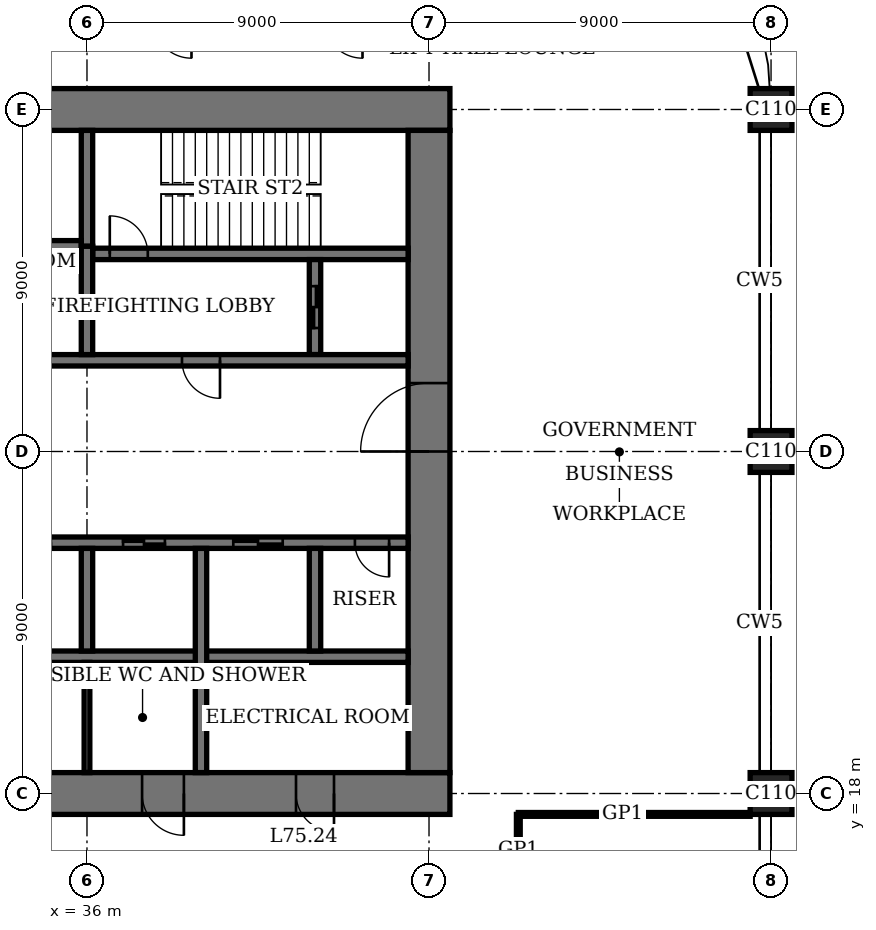
"""IFC4 building model, lengths in metres.
Left out: names, types, materials, properties, quantities, classifications, styles, units other than length and angle.
Written with IfcOpenShell. Run it as: python <this file> out.ifc"""

import sys

from ifc_helpers import new_model, si_unit, direction, frame, frame_2d, origin, origin_2d, place, context, subcontext, project, spatial, rectangle, extrude, element, fill, save


model = new_model("IFC4")
c1 = context("Model", 3, precision=1e-05, world=origin(), true_north=direction((0.0, 1.0)))
c2 = subcontext(c1, "Body", "Model", "MODEL_VIEW")
j1 = project(units=[si_unit("LENGTHUNIT", "METRE"), si_unit("PLANEANGLEUNIT", "RADIAN")], contexts=[c1])
p1 = place(None, origin())
s1 = spatial("IfcSite", under=j1, at=p1, CompositionType="ELEMENT")
p2 = place(p1, origin())
s2 = spatial("IfcBuilding", under=s1, at=p2, CompositionType="ELEMENT")
p3 = place(p2, frame((0.0, 0.0, 307.4)))
s3 = spatial("IfcBuildingStorey", under=s2, at=p3, CompositionType="ELEMENT", Elevation=307.4)
for number, where, z_axis, x_axis in (
    (1, (54.0, 18.0, 0.0), (0.0, 0.0, 1.0), (1.0, 0.0, 0.0)),
    (2, (54.0, 27.0, 0.0), (0.0, 0.0, 1.0), (1.0, 0.0, 0.0)),
    (3, (54.0, 36.0, 0.0), (0.0, 0.0, 1.0), (1.0, 0.0, 0.0)),
):
    element("IfcColumn", number, at=place(p3, frame(where, z_axis=z_axis, x_axis=x_axis)), inside=s3, PredefinedType="COLUMN", context=c2, shape_type="SweptSolid", body=[
        extrude(rectangle(XDim=1.1, YDim=1.1, at=origin_2d()), origin(), (0.0, 0.0, 1.0), 4.4),
    ])
p4 = place(p3, frame((17.45, 18.0, 0.0), z_axis=(0.0, 0.0, 1.0), x_axis=(1.0, 0.0, 0.0)))
e4 = element("IfcWall", 4, at=p4, inside=s3, PredefinedType="SHEAR", context=c2, shape_type="SweptSolid", body=[
    extrude(rectangle(XDim=28.1, YDim=1.1, at=frame_2d((14.05, 0.0))), origin(), (0.0, 0.0, 1.0), 4.4),
])
p5 = place(p4, frame((11.55, 0.0, 0.0)))
e5 = element("IfcOpeningElement", 5, at=p5, cuts=e4, PredefinedType="OPENING", context=c2, shape_type="SweptSolid", body=[
    extrude(rectangle(XDim=1.0, YDim=2.4, at=frame_2d((0.5, 1.2))), frame((0.0, 0.56, 0.0), z_axis=(0.0, -1.0, 0.0), x_axis=(1.0, 0.0, 0.0)), (0.0, 0.0, 1.0), 1.12),
])
p6 = place(p4, frame((16.55, 0.0, 0.0)))
e6 = element("IfcOpeningElement", 6, at=p6, cuts=e4, PredefinedType="OPENING", context=c2, shape_type="SweptSolid", body=[
    extrude(rectangle(XDim=1.0, YDim=2.4, at=frame_2d((0.5, 1.2))), frame((0.0, 0.56, 0.0), z_axis=(0.0, -1.0, 0.0), x_axis=(1.0, 0.0, 0.0)), (0.0, 0.0, 1.0), 1.12),
])
p7 = place(p4, frame((20.0, 0.0, 0.0)))
e7 = element("IfcOpeningElement", 7, at=p7, cuts=e4, PredefinedType="OPENING", context=c2, shape_type="SweptSolid", body=[
    extrude(rectangle(XDim=1.1, YDim=2.4, at=frame_2d((0.55, 1.2))), frame((0.0, 0.56, 0.0), z_axis=(0.0, -1.0, 0.0), x_axis=(1.0, 0.0, 0.0)), (0.0, 0.0, 1.0), 1.12),
])
p8 = place(p4, frame((24.05, 0.0, 0.0)))
e8 = element("IfcOpeningElement", 8, at=p8, cuts=e4, PredefinedType="OPENING", context=c2, shape_type="SweptSolid", body=[
    extrude(rectangle(XDim=1.0, YDim=2.4, at=frame_2d((0.5, 1.2))), frame((0.0, 0.56, 0.0), z_axis=(0.0, -1.0, 0.0), x_axis=(1.0, 0.0, 0.0)), (0.0, 0.0, 1.0), 1.12),
])
p9 = place(p3, frame((45.55, 36.0, 0.0), z_axis=(0.0, 0.0, 1.0), x_axis=(-1.0, 0.0, 0.0)))
e9 = element("IfcWall", 9, at=p9, inside=s3, PredefinedType="SHEAR", context=c2, shape_type="SweptSolid", body=[
    extrude(rectangle(XDim=28.1, YDim=1.1, at=frame_2d((14.05, 0.0))), origin(), (0.0, 0.0, 1.0), 4.4),
])
p10 = place(p9, frame((11.55, 0.0, 0.0)))
e10 = element("IfcOpeningElement", 10, at=p10, cuts=e9, PredefinedType="OPENING", context=c2, shape_type="SweptSolid", body=[
    extrude(rectangle(XDim=1.0, YDim=2.4, at=frame_2d((0.5, 1.2))), frame((0.0, 0.56, 0.0), z_axis=(0.0, -1.0, 0.0), x_axis=(1.0, 0.0, 0.0)), (0.0, 0.0, 1.0), 1.12),
])
p11 = place(p9, frame((16.55, 0.0, 0.0)))
e11 = element("IfcOpeningElement", 11, at=p11, cuts=e9, PredefinedType="OPENING", context=c2, shape_type="SweptSolid", body=[
    extrude(rectangle(XDim=1.0, YDim=2.4, at=frame_2d((0.5, 1.2))), frame((0.0, 0.56, 0.0), z_axis=(0.0, -1.0, 0.0), x_axis=(1.0, 0.0, 0.0)), (0.0, 0.0, 1.0), 1.12),
])
p12 = place(p9, frame((20.0, 0.0, 0.0)))
e12 = element("IfcOpeningElement", 12, at=p12, cuts=e9, PredefinedType="OPENING", context=c2, shape_type="SweptSolid", body=[
    extrude(rectangle(XDim=1.1, YDim=2.4, at=frame_2d((0.55, 1.2))), frame((0.0, 0.56, 0.0), z_axis=(0.0, -1.0, 0.0), x_axis=(1.0, 0.0, 0.0)), (0.0, 0.0, 1.0), 1.12),
])
p13 = place(p9, frame((24.05, 0.0, 0.0)))
e13 = element("IfcOpeningElement", 13, at=p13, cuts=e9, PredefinedType="OPENING", context=c2, shape_type="SweptSolid", body=[
    extrude(rectangle(XDim=1.0, YDim=2.4, at=frame_2d((0.5, 1.2))), frame((0.0, 0.56, 0.0), z_axis=(0.0, -1.0, 0.0), x_axis=(1.0, 0.0, 0.0)), (0.0, 0.0, 1.0), 1.12),
])
p14 = place(p3, frame((45.0, 18.55, 0.0), z_axis=(0.0, 0.0, 1.0), x_axis=(0.0, 1.0, 0.0)))
e14 = element("IfcWall", 14, at=p14, inside=s3, PredefinedType="SHEAR", context=c2, shape_type="SweptSolid", body=[
    extrude(rectangle(XDim=16.9, YDim=1.1, at=frame_2d((8.45, 0.0))), origin(), (0.0, 0.0, 1.0), 4.4),
])
p15 = place(p14, frame((8.45, 0.0, 0.0)))
e15 = element("IfcOpeningElement", 15, at=p15, cuts=e14, PredefinedType="OPENING", context=c2, shape_type="SweptSolid", body=[
    extrude(rectangle(XDim=1.8, YDim=2.4, at=frame_2d((0.9, 1.2))), frame((0.0, 0.56, 0.0), z_axis=(0.0, -1.0, 0.0), x_axis=(1.0, 0.0, 0.0)), (0.0, 0.0, 1.0), 1.12),
])
p16 = place(p3, frame((36.15, 32.2, 0.0), z_axis=(0.0, 0.0, 1.0), x_axis=(1.0, 0.0, 0.0)))
e16 = element("IfcWall", 16, at=p16, inside=s3, PredefinedType="SHEAR", context=c2, shape_type="SweptSolid", body=[
    extrude(rectangle(XDim=8.3, YDim=0.3, at=frame_2d((4.15, 0.0))), origin(), (0.0, 0.0, 1.0), 4.4),
])
p17 = place(p16, frame((0.45, 0.0, 0.0)))
e17 = element("IfcOpeningElement", 17, at=p17, cuts=e16, PredefinedType="OPENING", context=c2, shape_type="SweptSolid", body=[
    extrude(rectangle(XDim=1.0, YDim=2.4, at=frame_2d((0.5, 1.2))), frame((0.0, 0.16, 0.0), z_axis=(0.0, -1.0, 0.0), x_axis=(1.0, 0.0, 0.0)), (0.0, 0.0, 1.0), 0.32),
])
p18 = place(p3, frame((36.0, 32.4, 0.0), z_axis=(0.0, 0.0, 1.0), x_axis=(0.0, 1.0, 0.0)))
e18 = element("IfcWall", 18, at=p18, inside=s3, PredefinedType="SHEAR", context=c2, shape_type="SweptSolid", body=[
    extrude(rectangle(XDim=3.05, YDim=0.3, at=frame_2d((1.525, 0.0))), origin(), (0.0, 0.0, 1.0), 4.4),
])
p19 = place(p3, frame((42.0, 29.55, 0.0), z_axis=(0.0, 0.0, 1.0), x_axis=(0.0, 1.0, 0.0)))
e19 = element("IfcWall", 19, at=p19, inside=s3, PredefinedType="SHEAR", context=c2, shape_type="SweptSolid", body=[
    extrude(rectangle(XDim=2.5, YDim=0.3, at=frame_2d((1.25, 0.0))), origin(), (0.0, 0.0, 1.0), 4.4),
])
p20 = place(p19, frame((0.7, 0.0, 0.0)))
e20 = element("IfcOpeningElement", 20, at=p20, cuts=e19, PredefinedType="OPENING", context=c2, shape_type="SweptSolid", body=[
    extrude(rectangle(XDim=1.1, YDim=2.4, at=frame_2d((0.55, 1.2))), frame((0.0, 0.16, 0.0), z_axis=(0.0, -1.0, 0.0), x_axis=(1.0, 0.0, 0.0)), (0.0, 0.0, 1.0), 0.32),
])
p21 = place(p3, frame((18.55, 24.6, 0.0), z_axis=(0.0, 0.0, 1.0), x_axis=(1.0, 0.0, 0.0)))
e21 = element("IfcWall", 21, at=p21, inside=s3, PredefinedType="SHEAR", context=c2, shape_type="SweptSolid", body=[
    extrude(rectangle(XDim=25.9, YDim=0.3, at=frame_2d((12.95, 0.0))), origin(), (0.0, 0.0, 1.0), 4.4),
])
p22 = place(p21, frame((4.95, 0.0, 0.0)))
e22 = element("IfcOpeningElement", 22, at=p22, cuts=e21, PredefinedType="OPENING", context=c2, shape_type="SweptSolid", body=[
    extrude(rectangle(XDim=1.0, YDim=2.4, at=frame_2d((0.5, 1.2))), frame((0.0, 0.16, 0.0), z_axis=(0.0, -1.0, 0.0), x_axis=(1.0, 0.0, 0.0)), (0.0, 0.0, 1.0), 0.32),
])
p23 = place(p21, frame((24.5, 0.0, 0.0)))
e23 = element("IfcOpeningElement", 23, at=p23, cuts=e21, PredefinedType="OPENING", context=c2, shape_type="SweptSolid", body=[
    extrude(rectangle(XDim=0.9, YDim=2.1, at=frame_2d((0.45, 1.05))), frame((0.0, 0.16, 0.0), z_axis=(0.0, -1.0, 0.0), x_axis=(1.0, 0.0, 0.0)), (0.0, 0.0, 1.0), 0.32),
])
p24 = place(p21, frame((9.4, 0.0, 0.0)))
e24 = element("IfcOpeningElement", 24, at=p24, cuts=e21, PredefinedType="OPENING", context=c2, shape_type="SweptSolid", body=[
    extrude(rectangle(XDim=1.1, YDim=2.4, at=frame_2d((0.55, 1.2))), frame((0.0, 0.16, 0.0), z_axis=(0.0, -1.0, 0.0), x_axis=(1.0, 0.0, 0.0)), (0.0, 0.0, 1.0), 0.32),
])
p25 = place(p21, frame((12.4, 0.0, 0.0)))
e25 = element("IfcOpeningElement", 25, at=p25, cuts=e21, PredefinedType="OPENING", context=c2, shape_type="SweptSolid", body=[
    extrude(rectangle(XDim=1.1, YDim=2.4, at=frame_2d((0.55, 1.2))), frame((0.0, 0.16, 0.0), z_axis=(0.0, -1.0, 0.0), x_axis=(1.0, 0.0, 0.0)), (0.0, 0.0, 1.0), 0.32),
])
p26 = place(p21, frame((15.4, 0.0, 0.0)))
e26 = element("IfcOpeningElement", 26, at=p26, cuts=e21, PredefinedType="OPENING", context=c2, shape_type="SweptSolid", body=[
    extrude(rectangle(XDim=1.1, YDim=2.4, at=frame_2d((0.55, 1.2))), frame((0.0, 0.16, 0.0), z_axis=(0.0, -1.0, 0.0), x_axis=(1.0, 0.0, 0.0)), (0.0, 0.0, 1.0), 0.32),
])
p27 = place(p21, frame((18.4, 0.0, 0.0)))
e27 = element("IfcOpeningElement", 27, at=p27, cuts=e21, PredefinedType="OPENING", context=c2, shape_type="SweptSolid", body=[
    extrude(rectangle(XDim=1.1, YDim=2.4, at=frame_2d((0.55, 1.2))), frame((0.0, 0.16, 0.0), z_axis=(0.0, -1.0, 0.0), x_axis=(1.0, 0.0, 0.0)), (0.0, 0.0, 1.0), 0.32),
])
p28 = place(p21, frame((21.3, 0.0, 0.0)))
e28 = element("IfcOpeningElement", 28, at=p28, cuts=e21, PredefinedType="OPENING", context=c2, shape_type="SweptSolid", body=[
    extrude(rectangle(XDim=1.3, YDim=2.4, at=frame_2d((0.65, 1.2))), frame((0.0, 0.16, 0.0), z_axis=(0.0, -1.0, 0.0), x_axis=(1.0, 0.0, 0.0)), (0.0, 0.0, 1.0), 0.32),
])
p29 = place(p3, frame((18.55, 29.4, 0.0), z_axis=(0.0, 0.0, 1.0), x_axis=(1.0, 0.0, 0.0)))
e29 = element("IfcWall", 29, at=p29, inside=s3, PredefinedType="SHEAR", context=c2, shape_type="SweptSolid", body=[
    extrude(rectangle(XDim=25.9, YDim=0.3, at=frame_2d((12.95, 0.0))), origin(), (0.0, 0.0, 1.0), 4.4),
])
p30 = place(p29, frame((19.95, 0.0, 0.0)))
e30 = element("IfcOpeningElement", 30, at=p30, cuts=e29, PredefinedType="OPENING", context=c2, shape_type="SweptSolid", body=[
    extrude(rectangle(XDim=1.0, YDim=2.4, at=frame_2d((0.5, 1.2))), frame((0.0, 0.16, 0.0), z_axis=(0.0, -1.0, 0.0), x_axis=(1.0, 0.0, 0.0)), (0.0, 0.0, 1.0), 0.32),
])
p31 = place(p29, frame((0.5, 0.0, 0.0)))
e31 = element("IfcOpeningElement", 31, at=p31, cuts=e29, PredefinedType="OPENING", context=c2, shape_type="SweptSolid", body=[
    extrude(rectangle(XDim=0.9, YDim=2.1, at=frame_2d((0.45, 1.05))), frame((0.0, 0.16, 0.0), z_axis=(0.0, -1.0, 0.0), x_axis=(1.0, 0.0, 0.0)), (0.0, 0.0, 1.0), 0.32),
])
p32 = place(p29, frame((15.45, 0.0, 0.0)))
e32 = element("IfcOpeningElement", 32, at=p32, cuts=e29, PredefinedType="OPENING", context=c2, shape_type="SweptSolid", body=[
    extrude(rectangle(XDim=1.0, YDim=2.4, at=frame_2d((0.5, 1.2))), frame((0.0, 0.16, 0.0), z_axis=(0.0, -1.0, 0.0), x_axis=(1.0, 0.0, 0.0)), (0.0, 0.0, 1.0), 0.32),
])
p33 = place(p29, frame((12.45, 0.0, 0.0)))
e33 = element("IfcOpeningElement", 33, at=p33, cuts=e29, PredefinedType="OPENING", context=c2, shape_type="SweptSolid", body=[
    extrude(rectangle(XDim=1.0, YDim=2.4, at=frame_2d((0.5, 1.2))), frame((0.0, 0.16, 0.0), z_axis=(0.0, -1.0, 0.0), x_axis=(1.0, 0.0, 0.0)), (0.0, 0.0, 1.0), 0.32),
])
p34 = place(p29, frame((9.45, 0.0, 0.0)))
e34 = element("IfcOpeningElement", 34, at=p34, cuts=e29, PredefinedType="OPENING", context=c2, shape_type="SweptSolid", body=[
    extrude(rectangle(XDim=1.0, YDim=2.4, at=frame_2d((0.5, 1.2))), frame((0.0, 0.16, 0.0), z_axis=(0.0, -1.0, 0.0), x_axis=(1.0, 0.0, 0.0)), (0.0, 0.0, 1.0), 0.32),
])
p35 = place(p29, frame((6.45, 0.0, 0.0)))
e35 = element("IfcOpeningElement", 35, at=p35, cuts=e29, PredefinedType="OPENING", context=c2, shape_type="SweptSolid", body=[
    extrude(rectangle(XDim=1.0, YDim=2.4, at=frame_2d((0.5, 1.2))), frame((0.0, 0.16, 0.0), z_axis=(0.0, -1.0, 0.0), x_axis=(1.0, 0.0, 0.0)), (0.0, 0.0, 1.0), 0.32),
])
p36 = place(p29, frame((3.3, 0.0, 0.0)))
e36 = element("IfcOpeningElement", 36, at=p36, cuts=e29, PredefinedType="OPENING", context=c2, shape_type="SweptSolid", body=[
    extrude(rectangle(XDim=1.3, YDim=2.4, at=frame_2d((0.65, 1.2))), frame((0.0, 0.16, 0.0), z_axis=(0.0, -1.0, 0.0), x_axis=(1.0, 0.0, 0.0)), (0.0, 0.0, 1.0), 0.32),
])
for number, where, z_axis, x_axis in (
    (37, (27.15, 21.6, 0.0), (0.0, 0.0, 1.0), (1.0, 0.0, 0.0)),
    (38, (18.55, 32.4, 0.0), (0.0, 0.0, 1.0), (1.0, 0.0, 0.0)),
):
    element("IfcWall", number, at=place(p3, frame(where, z_axis=z_axis, x_axis=x_axis)), inside=s3, PredefinedType="SHEAR", context=c2, shape_type="SweptSolid", body=[
        extrude(rectangle(XDim=17.3, YDim=0.3, at=frame_2d((8.65, 0.0))), origin(), (0.0, 0.0, 1.0), 4.4),
    ])
p37 = place(p3, frame((36.0, 21.75, 0.0), z_axis=(0.0, 0.0, 1.0), x_axis=(0.0, 1.0, 0.0)))
e39 = element("IfcWall", 39, at=p37, inside=s3, PredefinedType="SHEAR", context=c2, shape_type="SweptSolid", body=[
    extrude(rectangle(XDim=2.7, YDim=0.3, at=frame_2d((1.35, 0.0))), origin(), (0.0, 0.0, 1.0), 4.4),
])
p38 = place(p3, frame((39.0, 18.55, 0.0), z_axis=(0.0, 0.0, 1.0), x_axis=(0.0, 1.0, 0.0)))
e40 = element("IfcWall", 40, at=p38, inside=s3, PredefinedType="SHEAR", context=c2, shape_type="SweptSolid", body=[
    extrude(rectangle(XDim=5.9, YDim=0.3, at=frame_2d((2.95, 0.0))), origin(), (0.0, 0.0, 1.0), 4.4),
])
p39 = place(p3, frame((42.0, 21.75, 0.0), z_axis=(0.0, 0.0, 1.0), x_axis=(0.0, 1.0, 0.0)))
e41 = element("IfcWall", 41, at=p39, inside=s3, PredefinedType="SHEAR", context=c2, shape_type="SweptSolid", body=[
    extrude(rectangle(XDim=2.7, YDim=0.3, at=frame_2d((1.35, 0.0))), origin(), (0.0, 0.0, 1.0), 4.4),
])
p40 = place(p3, frame((36.0, 29.55, 0.0), z_axis=(0.0, 0.0, 1.0), x_axis=(0.0, 1.0, 0.0)))
e42 = element("IfcWall", 42, at=p40, inside=s3, PredefinedType="SHEAR", context=c2, shape_type="SweptSolid", body=[
    extrude(rectangle(XDim=2.85, YDim=0.3, at=frame_2d((1.425, 0.0))), origin(), (0.0, 0.0, 1.0), 4.4),
])
p41 = place(p3, frame((47.35, 17.45, 0.0), z_axis=(0.0, 0.0, 1.0), x_axis=(1.0, 0.0, 0.0)))
e43 = element("IfcWall", 43, at=p41, inside=s3, PredefinedType="PARTITIONING", context=c2, shape_type="SweptSolid", body=[
    extrude(rectangle(XDim=6.1, YDim=0.1, at=frame_2d((3.05, 0.0))), origin(), (0.0, 0.0, 1.0), 4.05),
])
p42 = place(p3, frame((47.35, 15.6, 0.0), z_axis=(0.0, 0.0, 1.0), x_axis=(0.0, 1.0, 0.0)))
e44 = element("IfcWall", 44, at=p42, inside=s3, PredefinedType="PARTITIONING", context=c2, shape_type="SweptSolid", body=[
    extrude(rectangle(XDim=1.85, YDim=0.1, at=frame_2d((0.925, 0.0))), origin(), (0.0, 0.0, 1.0), 4.05),
])
p43 = place(p3, frame((36.0, 18.55, 0.0), z_axis=(0.0, 0.0, 1.0), x_axis=(0.0, 1.0, 0.0)))
e45 = element("IfcWall", 45, at=p43, inside=s3, PredefinedType="PARTITIONING", context=c2, shape_type="SweptSolid", body=[
    extrude(rectangle(XDim=2.9, YDim=0.15, at=frame_2d((1.45, 0.0))), origin(), (0.0, 0.0, 1.0), 4.05),
])
p44 = place(p15, origin())
e46 = element("IfcDoor", 46, at=p44, inside=s3, OperationType="DOUBLE_DOOR_DOUBLE_SWING", PredefinedType="DOOR", context=c2, shape_type="SweptSolid", body=[
    extrude(rectangle(XDim=1.8, YDim=2.4, at=frame_2d((0.9, 1.2))), frame((0.0, 0.03, 0.0), z_axis=(0.0, -1.0, 0.0), x_axis=(1.0, 0.0, 0.0)), (0.0, 0.0, 1.0), 0.06),
    extrude(rectangle(XDim=0.04, YDim=2.4, at=frame_2d((0.02, 1.2))), frame((0.0, 0.55, 0.0), z_axis=(0.0, -1.0, 0.0), x_axis=(1.0, 0.0, 0.0)), (0.0, 0.0, 1.0), 1.1),
    extrude(rectangle(XDim=0.04, YDim=2.4, at=frame_2d((1.78, 1.2))), frame((0.0, 0.55, 0.0), z_axis=(0.0, -1.0, 0.0), x_axis=(1.0, 0.0, 0.0)), (0.0, 0.0, 1.0), 1.1),
    extrude(rectangle(XDim=1.8, YDim=0.04, at=frame_2d((0.9, 2.38))), frame((0.0, 0.55, 0.0), z_axis=(0.0, -1.0, 0.0), x_axis=(1.0, 0.0, 0.0)), (0.0, 0.0, 1.0), 1.1),
])
fill(e15, e46)
p45 = place(p7, origin())
e47 = element("IfcDoor", 47, at=p45, inside=s3, OperationType="SINGLE_SWING_RIGHT", PredefinedType="DOOR", context=c2, shape_type="SweptSolid", body=[
    extrude(rectangle(XDim=1.1, YDim=2.4, at=frame_2d((0.55, 1.2))), frame((0.0, 0.025, 0.0), z_axis=(0.0, -1.0, 0.0), x_axis=(1.0, 0.0, 0.0)), (0.0, 0.0, 1.0), 0.05),
    extrude(rectangle(XDim=0.04, YDim=2.4, at=frame_2d((0.02, 1.2))), frame((0.0, 0.44, 0.0), z_axis=(0.0, -1.0, 0.0), x_axis=(1.0, 0.0, 0.0)), (0.0, 0.0, 1.0), 0.88),
    extrude(rectangle(XDim=0.04, YDim=2.4, at=frame_2d((1.08, 1.2))), frame((0.0, 0.44, 0.0), z_axis=(0.0, -1.0, 0.0), x_axis=(1.0, 0.0, 0.0)), (0.0, 0.0, 1.0), 0.88),
    extrude(rectangle(XDim=1.1, YDim=0.04, at=frame_2d((0.55, 2.38))), frame((0.0, 0.44, 0.0), z_axis=(0.0, -1.0, 0.0), x_axis=(1.0, 0.0, 0.0)), (0.0, 0.0, 1.0), 0.88),
])
fill(e7, e47)
p46 = place(p8, origin())
e48 = element("IfcDoor", 48, at=p46, inside=s3, OperationType="SINGLE_SWING_RIGHT", PredefinedType="DOOR", context=c2, shape_type="SweptSolid", body=[
    extrude(rectangle(XDim=1.0, YDim=2.4, at=frame_2d((0.5, 1.2))), frame((0.0, 0.025, 0.0), z_axis=(0.0, -1.0, 0.0), x_axis=(1.0, 0.0, 0.0)), (0.0, 0.0, 1.0), 0.05),
    extrude(rectangle(XDim=0.04, YDim=2.4, at=frame_2d((0.02, 1.2))), frame((0.0, 0.4, 0.0), z_axis=(0.0, -1.0, 0.0), x_axis=(1.0, 0.0, 0.0)), (0.0, 0.0, 1.0), 0.8),
    extrude(rectangle(XDim=0.04, YDim=2.4, at=frame_2d((0.98, 1.2))), frame((0.0, 0.4, 0.0), z_axis=(0.0, -1.0, 0.0), x_axis=(1.0, 0.0, 0.0)), (0.0, 0.0, 1.0), 0.8),
    extrude(rectangle(XDim=1.0, YDim=0.04, at=frame_2d((0.5, 2.38))), frame((0.0, 0.4, 0.0), z_axis=(0.0, -1.0, 0.0), x_axis=(1.0, 0.0, 0.0)), (0.0, 0.0, 1.0), 0.8),
])
fill(e8, e48)
p47 = place(p17, origin())
e49 = element("IfcDoor", 49, at=p47, inside=s3, OperationType="SINGLE_SWING_RIGHT", PredefinedType="DOOR", context=c2, shape_type="SweptSolid", body=[
    extrude(rectangle(XDim=1.0, YDim=2.4, at=frame_2d((0.5, 1.2))), frame((0.0, 0.03, 0.0), z_axis=(0.0, -1.0, 0.0), x_axis=(1.0, 0.0, 0.0)), (0.0, 0.0, 1.0), 0.06),
])
fill(e17, e49)
p48 = place(p30, origin())
e50 = element("IfcDoor", 50, at=p48, inside=s3, OperationType="SINGLE_SWING_RIGHT", PredefinedType="DOOR", context=c2, shape_type="SweptSolid", body=[
    extrude(rectangle(XDim=1.0, YDim=2.4, at=frame_2d((0.5, 1.2))), frame((0.0, 0.03, 0.0), z_axis=(0.0, -1.0, 0.0), x_axis=(1.0, 0.0, 0.0)), (0.0, 0.0, 1.0), 0.06),
])
fill(e30, e50)
p49 = place(p23, origin())
e51 = element("IfcDoor", 51, at=p49, inside=s3, OperationType="SINGLE_SWING_RIGHT", PredefinedType="DOOR", context=c2, shape_type="SweptSolid", body=[
    extrude(rectangle(XDim=0.9, YDim=2.1, at=frame_2d((0.45, 1.05))), frame((0.0, 0.03, 0.0), z_axis=(0.0, -1.0, 0.0), x_axis=(1.0, 0.0, 0.0)), (0.0, 0.0, 1.0), 0.06),
])
fill(e23, e51)
p50 = place(p27, origin())
e52 = element("IfcDoor", 52, at=p50, inside=s3, OperationType="DOUBLE_DOOR_SLIDING", PredefinedType="DOOR", context=c2, shape_type="SweptSolid", body=[
    extrude(rectangle(XDim=1.1, YDim=2.4, at=frame_2d((0.55, 1.2))), frame((0.0, 0.02, 0.0), z_axis=(0.0, -1.0, 0.0), x_axis=(1.0, 0.0, 0.0)), (0.0, 0.0, 1.0), 0.04),
])
fill(e27, e52)
p51 = place(p28, origin())
e53 = element("IfcDoor", 53, at=p51, inside=s3, OperationType="DOUBLE_DOOR_SLIDING", PredefinedType="DOOR", context=c2, shape_type="SweptSolid", body=[
    extrude(rectangle(XDim=1.3, YDim=2.4, at=frame_2d((0.65, 1.2))), frame((0.0, 0.02, 0.0), z_axis=(0.0, -1.0, 0.0), x_axis=(1.0, 0.0, 0.0)), (0.0, 0.0, 1.0), 0.04),
])
fill(e28, e53)
p52 = place(p20, origin())
e54 = element("IfcDoor", 54, at=p52, inside=s3, OperationType="DOUBLE_DOOR_SLIDING", PredefinedType="DOOR", context=c2, shape_type="SweptSolid", body=[
    extrude(rectangle(XDim=1.1, YDim=2.4, at=frame_2d((0.55, 1.2))), frame((0.0, 0.03, 0.0), z_axis=(0.0, -1.0, 0.0), x_axis=(1.0, 0.0, 0.0)), (0.0, 0.0, 1.0), 0.06),
])
fill(e20, e54)
save(model, sys.argv[1])
